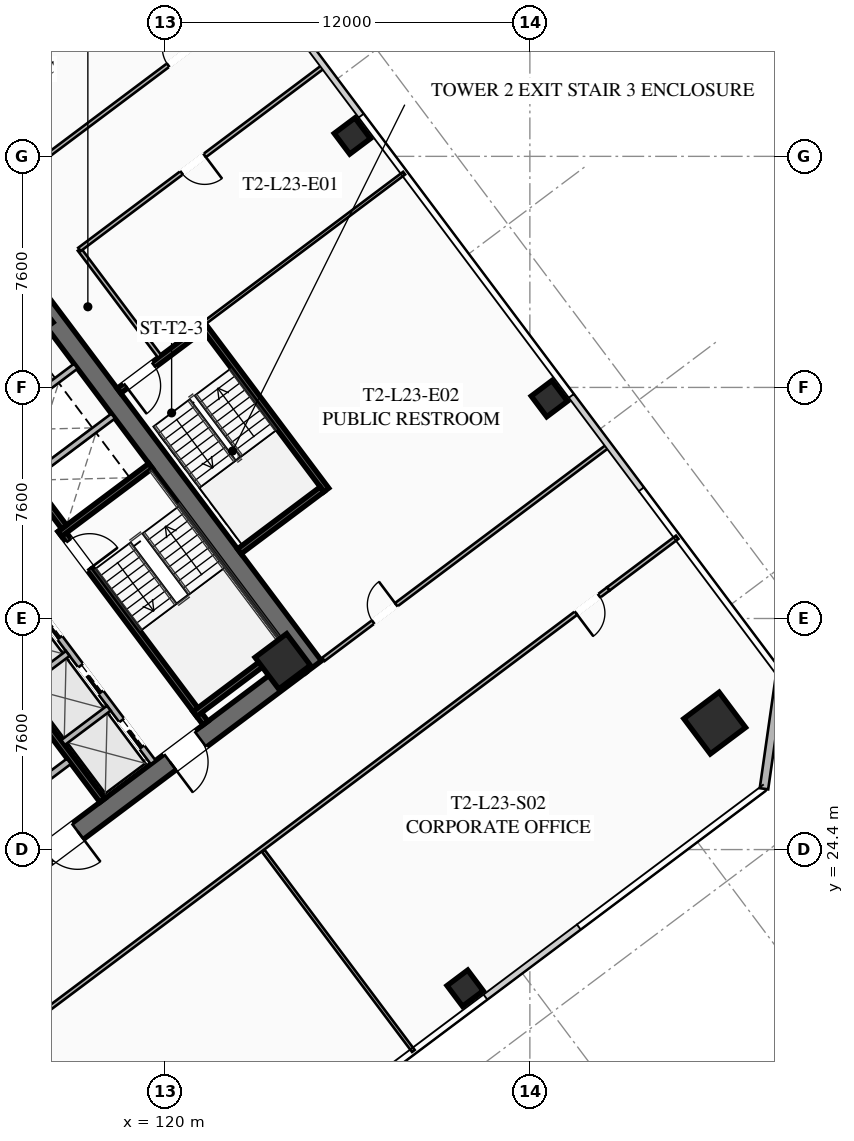
"""IFC4 building model, lengths in metres.
Left out: names, types, materials, properties, quantities, classifications, styles, units other than length and angle.
Written with IfcOpenShell. Run it as: python <this file> out.ifc"""

import sys

from ifc_helpers import new_model, si_unit, direction, frame, frame_2d, origin, origin_2d, place, context, subcontext, project, spatial, rectangle, hollow_rectangle, extrude, element, fill, save


model = new_model("IFC4")
c1 = context("Model", 3, precision=1e-05, world=origin(), true_north=direction((0.0, 1.0)))
c2 = subcontext(c1, "Body", "Model", "MODEL_VIEW")
j1 = project(units=[si_unit("LENGTHUNIT", "METRE"), si_unit("PLANEANGLEUNIT", "RADIAN")], contexts=[c1])
p1 = place(None, origin())
s1 = spatial("IfcSite", under=j1, at=p1, CompositionType="ELEMENT")
p2 = place(p1, origin())
s2 = spatial("IfcBuilding", under=s1, at=p2, CompositionType="ELEMENT")
p3 = place(p2, frame((0.0, 0.0, 88.5)))
s3 = spatial("IfcBuildingStorey", under=s2, at=p3, CompositionType="ELEMENT", Elevation=88.5)
p4 = place(p3, frame((115.524, 42.893, 0.0), z_axis=(0.0, 0.0, 1.0), x_axis=(0.600005007985, -0.799996243986, 0.0)))
e1 = element("IfcWall", 1, at=p4, inside=s3, PredefinedType="SHEAR", context=c2, shape_type="SweptSolid", body=[
    extrude(rectangle(XDim=15.6, YDim=0.65, at=frame_2d((7.8, 0.0))), origin(), (0.0, 0.0, 1.0), 3.55),
])
p5 = place(p3, frame((124.429, 30.478, 0.0), z_axis=(0.0, 0.0, 1.0), x_axis=(-0.799998028465, -0.600002628705, 0.0)))
e2 = element("IfcWall", 2, at=p5, inside=s3, PredefinedType="SHEAR", context=c2, shape_type="SweptSolid", body=[
    extrude(rectangle(XDim=14.86, YDim=0.65, at=frame_2d((7.43, 0.0))), origin(), (0.0, 0.0, 1.0), 3.55),
])
p6 = place(p5, frame((9.13, 0.0, 0.0)))
e3 = element("IfcOpeningElement", 3, at=p6, cuts=e2, PredefinedType="OPENING", context=c2, shape_type="SweptSolid", body=[
    extrude(rectangle(XDim=1.25, YDim=2.25, at=frame_2d((0.625, 1.125))), frame((0.0, 0.335, 0.0), z_axis=(0.0, -1.0, 0.0), x_axis=(1.0, 0.0, 0.0)), (0.0, 0.0, 1.0), 0.67),
])
p7 = place(p5, frame((4.08, 0.0, 0.0)))
e4 = element("IfcOpeningElement", 4, at=p7, cuts=e2, PredefinedType="OPENING", context=c2, shape_type="SweptSolid", body=[
    extrude(rectangle(XDim=1.25, YDim=2.25, at=frame_2d((0.625, 1.125))), frame((0.0, 0.335, 0.0), z_axis=(0.0, -1.0, 0.0), x_axis=(1.0, 0.0, 0.0)), (0.0, 0.0, 1.0), 0.67),
])
for number, where, z_axis, x_axis in (
    (5, (123.87, 30.59, 0.0), (0.0, 0.0, 1.0), (0.8, 0.6, 0.0)),
    (6, (115.41, 41.87, 0.0), (0.0, 0.0, 1.0), (0.8, 0.6, 0.0)),
):
    element("IfcColumn", number, at=place(p3, frame(where, z_axis=z_axis, x_axis=x_axis)), inside=s3, PredefinedType="COLUMN", context=c2, shape_type="SweptSolid", body=[
        extrude(hollow_rectangle(XDim=1.3, YDim=1.3, WallThickness=0.05, at=origin_2d()), origin(), (0.0, 0.0, 1.0), 3.35),
    ])
p8 = place(p3, frame((138.08, 28.56, 0.0), z_axis=(0.0, 0.0, 1.0), x_axis=(0.799999996291, 0.600000004945, 0.0)))
e7 = element("IfcColumn", 7, at=p8, inside=s3, PredefinedType="COLUMN", context=c2, shape_type="SweptSolid", body=[
    extrude(hollow_rectangle(XDim=1.45, YDim=1.45, WallThickness=0.055, at=origin_2d()), origin(), (0.0, 0.0, 1.0), 3.35),
])
for number, where, z_axis, x_axis in (
    (8, (129.87, 19.84, 0.0), (0.0, 0.0, 1.0), (0.8, 0.6, 0.0)),
    (9, (132.64, 39.23, 0.0), (0.0, 0.0, 1.0), (0.8, 0.6, 0.0)),
    (10, (126.16, 47.87, 0.0), (0.0, 0.0, 1.0), (0.8, 0.6, 0.0)),
):
    element("IfcColumn", number, at=place(p3, frame(where, z_axis=z_axis, x_axis=x_axis)), inside=s3, PredefinedType="COLUMN", context=c2, shape_type="SweptSolid", body=[
        extrude(hollow_rectangle(XDim=0.85, YDim=0.85, WallThickness=0.035, at=origin_2d()), origin(), (0.0, 0.0, 1.0), 3.35),
    ])
p9 = place(p3, frame((140.24, 30.18, 0.0), z_axis=(0.0, 0.0, 1.0), x_axis=(-0.141430307517, -0.989948214866, 0.0)))
e11 = element("IfcWall", 11, at=p9, inside=s3, PredefinedType="SOLIDWALL", context=c2, shape_type="SweptSolid", body=[
    extrude(rectangle(XDim=3.818, YDim=0.28, at=frame_2d((1.909, 0.0))), origin(), (0.0, 0.0, 1.0), 3.35),
])
p10 = place(p3, frame((116.56, 34.92, 0.0), z_axis=(0.0, 0.0, 1.0), x_axis=(0.600009827119, -0.799992629566, 0.0)))
e12 = element("IfcWall", 12, at=p10, inside=s3, PredefinedType="SHEAR", context=c2, shape_type="SweptSolid", body=[
    extrude(rectangle(XDim=7.95, YDim=0.2, at=frame_2d((3.975, 0.0))), origin(), (0.0, 0.0, 1.0), 3.35),
])
p11 = place(p10, frame((0.45, 0.0, 0.0)))
e13 = element("IfcOpeningElement", 13, at=p11, cuts=e12, PredefinedType="OPENING", context=c2, shape_type="SweptSolid", body=[
    extrude(rectangle(XDim=1.15, YDim=2.2, at=frame_2d((0.575, 1.1))), frame((0.0, 0.11, 0.0), z_axis=(0.0, -1.0, 0.0), x_axis=(1.0, 0.0, 0.0)), (0.0, 0.0, 1.0), 0.22),
])
for number, where, z_axis, x_axis in (
    (14, (116.54, 34.78, 0.0), (0.0, 0.0, 1.0), (0.8, 0.6, 0.0)),
    (15, (120.98, 28.86, 0.0), (0.0, 0.0, 1.0), (0.8, 0.6, 0.0)),
):
    element("IfcWall", number, at=place(p3, frame(where, z_axis=z_axis, x_axis=x_axis)), inside=s3, PredefinedType="SHEAR", context=c2, shape_type="SweptSolid", body=[
        extrude(rectangle(XDim=3.73, YDim=0.2, at=frame_2d((1.865, 0.0))), origin(), (0.0, 0.0, 1.0), 3.35),
    ])
p12 = place(p3, frame((117.938, 26.016, 0.0), z_axis=(0.0, 0.0, 1.0), x_axis=(-0.600005463273, 0.799995902516, 0.0)))
e16 = element("IfcWall", 16, at=p12, inside=s3, PredefinedType="SHEAR", context=c2, shape_type="SweptSolid", body=[
    extrude(rectangle(XDim=14.3, YDim=0.2, at=frame_2d((7.15, 0.0))), origin(), (0.0, 0.0, 1.0), 3.35),
])
p13 = place(p3, frame((114.316, 25.412, 0.0), z_axis=(0.0, 0.0, 1.0), x_axis=(0.800018601094, 0.59997519774, 0.0)))
e17 = element("IfcWall", 17, at=p13, inside=s3, PredefinedType="SOLIDWALL", context=c2, shape_type="SweptSolid", body=[
    extrude(rectangle(XDim=3.15, YDim=0.22, at=frame_2d((1.575, 0.0))), origin(), (0.0, 0.0, 1.0), 2.703),
])
p14 = place(p13, frame((0.95, 0.0, 0.0)))
e18 = element("IfcOpeningElement", 18, at=p14, cuts=e17, PredefinedType="OPENING", context=c2, shape_type="SweptSolid", body=[
    extrude(rectangle(XDim=1.25, YDim=2.25, at=frame_2d((0.625, 1.125))), frame((0.0, 0.12, 0.0), z_axis=(0.0, -1.0, 0.0), x_axis=(1.0, 0.0, 0.0)), (0.0, 0.0, 1.0), 0.24),
])
p15 = place(p3, frame((112.87, 40.09, 0.0), z_axis=(0.0, 0.0, 1.0), x_axis=(0.599975393228, -0.800018454488, 0.0)))
e19 = element("IfcWall", 19, at=p15, inside=s3, PredefinedType="SHEAR", context=c2, shape_type="SweptSolid", body=[
    extrude(rectangle(XDim=6.35, YDim=0.2, at=frame_2d((3.175, 0.0))), origin(), (0.0, 0.0, 1.0), 3.35),
])
for number, where, z_axis, x_axis in (
    (20, (115.59, 36.63, 0.0), (0.0, 0.0, 1.0), (0.8, 0.6, 0.0)),
    (21, (114.36, 38.27, 0.0), (0.0, 0.0, 1.0), (0.8, 0.6, 0.0)),
):
    element("IfcWall", number, at=place(p3, frame(where, z_axis=z_axis, x_axis=x_axis)), inside=s3, PredefinedType="SOLIDWALL", context=c2, shape_type="SweptSolid", body=[
        extrude(rectangle(XDim=3.38, YDim=0.2, at=frame_2d((1.69, 0.0))), origin(), (0.0, 0.0, 1.0), 3.35),
    ])
p16 = place(p3, frame((119.61, 27.27, 0.0), z_axis=(0.0, 0.0, 1.0), x_axis=(-0.600011488909, 0.79999138319, 0.0)))
e22 = element("IfcWall", 22, at=p16, inside=s3, PredefinedType="SOLIDWALL", context=c2, shape_type="SweptSolid", body=[
    extrude(rectangle(XDim=6.8, YDim=0.2, at=frame_2d((3.4, 0.0))), origin(), (0.0, 0.0, 1.0), 3.35),
])
p17 = place(p16, frame((0.625, 0.0, 0.0)))
e23 = element("IfcOpeningElement", 23, at=p17, cuts=e22, PredefinedType="OPENING", context=c2, shape_type="SweptSolid", body=[
    extrude(rectangle(XDim=1.1, YDim=2.2, at=frame_2d((0.55, 1.1))), frame((0.0, 0.11, 0.0), z_axis=(0.0, -1.0, 0.0), x_axis=(1.0, 0.0, 0.0)), (0.0, 0.0, 1.0), 0.22),
])
p18 = place(p16, frame((2.875, 0.0, 0.0)))
e24 = element("IfcOpeningElement", 24, at=p18, cuts=e22, PredefinedType="OPENING", context=c2, shape_type="SweptSolid", body=[
    extrude(rectangle(XDim=1.1, YDim=2.2, at=frame_2d((0.55, 1.1))), frame((0.0, 0.11, 0.0), z_axis=(0.0, -1.0, 0.0), x_axis=(1.0, 0.0, 0.0)), (0.0, 0.0, 1.0), 0.22),
])
p19 = place(p16, frame((5.125, 0.0, 0.0)))
e25 = element("IfcOpeningElement", 25, at=p19, cuts=e22, PredefinedType="OPENING", context=c2, shape_type="SweptSolid", body=[
    extrude(rectangle(XDim=1.1, YDim=2.2, at=frame_2d((0.55, 1.1))), frame((0.0, 0.11, 0.0), z_axis=(0.0, -1.0, 0.0), x_axis=(1.0, 0.0, 0.0)), (0.0, 0.0, 1.0), 0.22),
])
p20 = place(p3, frame((116.646, 27.922, 0.0), z_axis=(0.0, 0.0, 1.0), x_axis=(0.8, 0.6, 0.0)))
e26 = element("IfcWall", 26, at=p20, inside=s3, PredefinedType="SOLIDWALL", context=c2, shape_type="SweptSolid", body=[
    extrude(rectangle(XDim=1.88, YDim=0.2, at=frame_2d((0.94, 0.0))), origin(), (0.0, 0.0, 1.0), 3.35),
])
p21 = place(p3, frame((115.296, 29.722, 0.0), z_axis=(0.0, 0.0, 1.0), x_axis=(0.799984418148, 0.600020775241, 0.0)))
e27 = element("IfcWall", 27, at=p21, inside=s3, PredefinedType="SOLIDWALL", context=c2, shape_type="SweptSolid", body=[
    extrude(rectangle(XDim=1.88, YDim=0.2, at=frame_2d((0.94, 0.0))), origin(), (0.0, 0.0, 1.0), 3.35),
])
p22 = place(p3, frame((125.304, 36.228, 0.0), z_axis=(0.0, 0.0, 1.0), x_axis=(-0.59998851072, 0.800008616831, 0.0)))
e28 = element("IfcWall", 28, at=p22, inside=s3, PredefinedType="SHEAR", context=c2, shape_type="SweptSolid", body=[
    extrude(rectangle(XDim=6.8, YDim=0.2, at=frame_2d((3.4, 0.0))), origin(), (0.0, 0.0, 1.0), 3.35),
])
p23 = place(p3, frame((121.204, 41.528, 0.0), z_axis=(0.0, 0.0, 1.0), x_axis=(-0.800017232136, -0.599977023131, 0.0)))
e29 = element("IfcWall", 29, at=p23, inside=s3, PredefinedType="SHEAR", context=c2, shape_type="SweptSolid", body=[
    extrude(rectangle(XDim=3.4, YDim=0.2, at=frame_2d((1.7, 0.0))), origin(), (0.0, 0.0, 1.0), 3.35),
])
p24 = place(p23, frame((1.975, 0.0, 0.0)))
e30 = element("IfcOpeningElement", 30, at=p24, cuts=e29, PredefinedType="OPENING", context=c2, shape_type="SweptSolid", body=[
    extrude(rectangle(XDim=1.15, YDim=2.2, at=frame_2d((0.575, 1.1))), frame((0.0, 0.11, 0.0), z_axis=(0.0, -1.0, 0.0), x_axis=(1.0, 0.0, 0.0)), (0.0, 0.0, 1.0), 0.22),
])
p25 = place(p3, frame((122.444, 34.208, 0.0), z_axis=(0.0, 0.0, 1.0), x_axis=(0.79999138319, 0.600011488909, 0.0)))
e31 = element("IfcWall", 31, at=p25, inside=s3, PredefinedType="SHEAR", context=c2, shape_type="SweptSolid", body=[
    extrude(rectangle(XDim=3.4, YDim=0.2, at=frame_2d((1.7, 0.0))), origin(), (0.0, 0.0, 1.0), 3.35),
])
p26 = place(p3, frame((119.824, 40.618, 0.0), z_axis=(0.0, 0.0, 1.0), x_axis=(-0.599982243973, 0.800013316712, 0.0)))
e32 = element("IfcWall", 32, at=p26, inside=s3, PredefinedType="PARTITIONING", context=c2, shape_type="SweptSolid", body=[
    extrude(rectangle(XDim=4.4, YDim=0.135, at=frame_2d((2.2, 0.0))), origin(), (0.0, 0.0, 1.0), 2.703),
])
p27 = place(p3, frame((98.516, 34.012, 0.0), z_axis=(0.0, 0.0, 1.0), x_axis=(0.8, 0.6, 0.0)))
e33 = element("IfcWall", 33, at=p27, inside=s3, PredefinedType="PARTITIONING", context=c2, shape_type="SweptSolid", body=[
    extrude(rectangle(XDim=28.23, YDim=0.135, at=frame_2d((14.115, 0.0))), origin(), (0.0, 0.0, 1.0), 2.703),
])
p28 = place(p27, frame((0.3, 0.0, 0.0)))
e34 = element("IfcOpeningElement", 34, at=p28, cuts=e33, PredefinedType="OPENING", context=c2, shape_type="SweptSolid", body=[
    extrude(rectangle(XDim=0.95, YDim=2.05, at=frame_2d((0.475, 1.025))), frame((0.0, 0.077, 0.0), z_axis=(0.0, -1.0, 0.0), x_axis=(1.0, 0.0, 0.0)), (0.0, 0.0, 1.0), 0.155),
])
p29 = place(p27, frame((26.98, 0.0, 0.0)))
e35 = element("IfcOpeningElement", 35, at=p29, cuts=e33, PredefinedType="OPENING", context=c2, shape_type="SweptSolid", body=[
    extrude(rectangle(XDim=0.95, YDim=2.05, at=frame_2d((0.475, 1.025))), frame((0.0, 0.077, 0.0), z_axis=(0.0, -1.0, 0.0), x_axis=(1.0, 0.0, 0.0)), (0.0, 0.0, 1.0), 0.155),
])
p30 = place(p3, frame((134.582, 32.974, 0.0), z_axis=(0.0, 0.0, 1.0), x_axis=(-0.799995848831, -0.600005534853, 0.0)))
e36 = element("IfcWall", 36, at=p30, inside=s3, PredefinedType="PARTITIONING", context=c2, shape_type="SweptSolid", body=[
    extrude(rectangle(XDim=28.23, YDim=0.135, at=frame_2d((14.115, 0.0))), origin(), (0.0, 0.0, 1.0), 2.703),
])
p31 = place(p30, frame((26.9, 0.0, 0.0)))
e37 = element("IfcOpeningElement", 37, at=p31, cuts=e36, PredefinedType="OPENING", context=c2, shape_type="SweptSolid", body=[
    extrude(rectangle(XDim=0.95, YDim=2.05, at=frame_2d((0.475, 1.025))), frame((0.0, 0.077, 0.0), z_axis=(0.0, -1.0, 0.0), x_axis=(1.0, 0.0, 0.0)), (0.0, 0.0, 1.0), 0.155),
])
p32 = place(p30, frame((0.38, 0.0, 0.0)))
e38 = element("IfcOpeningElement", 38, at=p32, cuts=e36, PredefinedType="OPENING", context=c2, shape_type="SweptSolid", body=[
    extrude(rectangle(XDim=0.95, YDim=2.05, at=frame_2d((0.475, 1.025))), frame((0.0, 0.077, 0.0), z_axis=(0.0, -1.0, 0.0), x_axis=(1.0, 0.0, 0.0)), (0.0, 0.0, 1.0), 0.155),
])
p33 = place(p3, frame((134.582, 32.974, 0.0), z_axis=(0.0, 0.0, 1.0), x_axis=(0.799989647378, 0.600013803248, 0.0)))
e39 = element("IfcWall", 39, at=p33, inside=s3, PredefinedType="PARTITIONING", context=c2, shape_type="SweptSolid", body=[
    extrude(rectangle(XDim=2.83, YDim=0.135, at=frame_2d((1.415, 0.0))), origin(), (0.0, 0.0, 1.0), 2.703),
])
p34 = place(p3, frame((128.168, 17.776, 0.0), z_axis=(0.0, 0.0, 1.0), x_axis=(-0.599985761145, 0.800010678943, 0.0)))
e40 = element("IfcWall", 40, at=p34, inside=s3, PredefinedType="PARTITIONING", context=c2, shape_type="SweptSolid", body=[
    extrude(rectangle(XDim=8.23, YDim=0.11, at=frame_2d((4.115, 0.0))), origin(), (0.0, 0.0, 1.0), 2.703),
])
p35 = place(p3, frame((125.224, 50.168, 0.0), z_axis=(0.0, 0.0, 1.0), x_axis=(-0.8, -0.6, 0.0)))
e41 = element("IfcWall", 41, at=p35, inside=s3, PredefinedType="PARTITIONING", context=c2, shape_type="SweptSolid", body=[
    extrude(rectangle(XDim=10.05, YDim=0.135, at=frame_2d((5.025, 0.0))), origin(), (0.0, 0.0, 1.0), 2.703),
])
p36 = place(p35, frame((4.9, 0.0, 0.0)))
e42 = element("IfcOpeningElement", 42, at=p36, cuts=e41, PredefinedType="OPENING", context=c2, shape_type="SweptSolid", body=[
    extrude(rectangle(XDim=0.95, YDim=2.05, at=frame_2d((0.475, 1.025))), frame((0.0, 0.077, 0.0), z_axis=(0.0, -1.0, 0.0), x_axis=(1.0, 0.0, 0.0)), (0.0, 0.0, 1.0), 0.155),
])
p37 = place(p3, frame((125.208, 30.656, 0.0), z_axis=(0.0, 0.0, 1.0), x_axis=(0.8, 0.6, 0.0)))
e43 = element("IfcWall", 43, at=p37, inside=s3, PredefinedType="PARTITIONING", context=c2, shape_type="SweptSolid", body=[
    extrude(rectangle(XDim=11.72, YDim=0.135, at=frame_2d((5.86, 0.0))), origin(), (0.0, 0.0, 1.0), 2.703),
])
p38 = place(p37, frame((2.045, 0.0, 0.0)))
e44 = element("IfcOpeningElement", 44, at=p38, cuts=e43, PredefinedType="OPENING", context=c2, shape_type="SweptSolid", body=[
    extrude(rectangle(XDim=0.95, YDim=2.05, at=frame_2d((0.475, 1.025))), frame((0.0, 0.077, 0.0), z_axis=(0.0, -1.0, 0.0), x_axis=(1.0, 0.0, 0.0)), (0.0, 0.0, 1.0), 0.155),
])
p39 = place(p3, frame((127.864, 46.648, 0.0), z_axis=(0.0, 0.0, 1.0), x_axis=(-0.800007145523, -0.599990472518, 0.0)))
e45 = element("IfcWall", 45, at=p39, inside=s3, PredefinedType="PARTITIONING", context=c2, shape_type="SweptSolid", body=[
    extrude(rectangle(XDim=8.2, YDim=0.11, at=frame_2d((4.1, 0.0))), origin(), (0.0, 0.0, 1.0), 2.703),
])
p40 = place(p6, origin())
e46 = element("IfcDoor", 46, at=p40, inside=s3, OperationType="SINGLE_SWING_LEFT", PredefinedType="DOOR", context=c2, shape_type="SweptSolid", body=[
    extrude(rectangle(XDim=1.25, YDim=2.25, at=frame_2d((0.625, 1.125))), frame((0.0, 0.025, 0.0), z_axis=(0.0, -1.0, 0.0), x_axis=(1.0, 0.0, 0.0)), (0.0, 0.0, 1.0), 0.05),
])
fill(e3, e46)
p41 = place(p7, origin())
e47 = element("IfcDoor", 47, at=p41, inside=s3, OperationType="SINGLE_SWING_RIGHT", PredefinedType="DOOR", context=c2, shape_type="SweptSolid", body=[
    extrude(rectangle(XDim=1.25, YDim=2.25, at=frame_2d((0.625, 1.125))), frame((0.0, 0.025, 0.0), z_axis=(0.0, -1.0, 0.0), x_axis=(1.0, 0.0, 0.0)), (0.0, 0.0, 1.0), 0.05),
])
fill(e4, e47)
p42 = place(p11, origin())
e48 = element("IfcDoor", 48, at=p42, inside=s3, OperationType="SINGLE_SWING_RIGHT", PredefinedType="DOOR", context=c2, shape_type="SweptSolid", body=[
    extrude(rectangle(XDim=1.15, YDim=2.2, at=frame_2d((0.575, 1.1))), frame((0.0, 0.025, 0.0), z_axis=(0.0, -1.0, 0.0), x_axis=(1.0, 0.0, 0.0)), (0.0, 0.0, 1.0), 0.05),
])
fill(e13, e48)
p43 = place(p24, origin())
e49 = element("IfcDoor", 49, at=p43, inside=s3, OperationType="SINGLE_SWING_RIGHT", PredefinedType="DOOR", context=c2, shape_type="SweptSolid", body=[
    extrude(rectangle(XDim=1.15, YDim=2.2, at=frame_2d((0.575, 1.1))), frame((0.0, 0.025, 0.0), z_axis=(0.0, -1.0, 0.0), x_axis=(1.0, 0.0, 0.0)), (0.0, 0.0, 1.0), 0.05),
])
fill(e30, e49)
p44 = place(p29, origin())
e50 = element("IfcDoor", 50, at=p44, inside=s3, OperationType="SINGLE_SWING_RIGHT", PredefinedType="DOOR", context=c2, shape_type="SweptSolid", body=[
    extrude(rectangle(XDim=0.95, YDim=2.05, at=frame_2d((0.475, 1.025))), frame((0.0, 0.025, 0.0), z_axis=(0.0, -1.0, 0.0), x_axis=(1.0, 0.0, 0.0)), (0.0, 0.0, 1.0), 0.05),
])
fill(e35, e50)
p45 = place(p32, origin())
e51 = element("IfcDoor", 51, at=p45, inside=s3, OperationType="SINGLE_SWING_RIGHT", PredefinedType="DOOR", context=c2, shape_type="SweptSolid", body=[
    extrude(rectangle(XDim=0.95, YDim=2.05, at=frame_2d((0.475, 1.025))), frame((0.0, 0.025, 0.0), z_axis=(0.0, -1.0, 0.0), x_axis=(1.0, 0.0, 0.0)), (0.0, 0.0, 1.0), 0.05),
])
fill(e38, e51)
p46 = place(p36, origin())
e52 = element("IfcDoor", 52, at=p46, inside=s3, OperationType="SINGLE_SWING_LEFT", PredefinedType="DOOR", context=c2, shape_type="SweptSolid", body=[
    extrude(rectangle(XDim=0.95, YDim=2.05, at=frame_2d((0.475, 1.025))), frame((0.0, 0.025, 0.0), z_axis=(0.0, -1.0, 0.0), x_axis=(1.0, 0.0, 0.0)), (0.0, 0.0, 1.0), 0.05),
])
fill(e42, e52)
p47 = place(p38, origin())
e53 = element("IfcDoor", 53, at=p47, inside=s3, OperationType="SINGLE_SWING_RIGHT", PredefinedType="DOOR", context=c2, shape_type="SweptSolid", body=[
    extrude(rectangle(XDim=0.95, YDim=2.05, at=frame_2d((0.475, 1.025))), frame((0.0, 0.025, 0.0), z_axis=(0.0, -1.0, 0.0), x_axis=(1.0, 0.0, 0.0)), (0.0, 0.0, 1.0), 0.05),
])
fill(e44, e53)
p48 = place(p17, origin())
e54 = element("IfcDoor", 54, at=p48, inside=s3, OperationType="SLIDING_TO_LEFT", PredefinedType="DOOR", context=c2, shape_type="SweptSolid", body=[
    extrude(rectangle(XDim=1.1, YDim=2.2, at=frame_2d((0.55, 1.1))), frame((0.0, 0.025, 0.0), z_axis=(0.0, -1.0, 0.0), x_axis=(1.0, 0.0, 0.0)), (0.0, 0.0, 1.0), 0.05),
])
fill(e23, e54)
p49 = place(p18, origin())
e55 = element("IfcDoor", 55, at=p49, inside=s3, OperationType="SLIDING_TO_LEFT", PredefinedType="DOOR", context=c2, shape_type="SweptSolid", body=[
    extrude(rectangle(XDim=1.1, YDim=2.2, at=frame_2d((0.55, 1.1))), frame((0.0, 0.025, 0.0), z_axis=(0.0, -1.0, 0.0), x_axis=(1.0, 0.0, 0.0)), (0.0, 0.0, 1.0), 0.05),
])
fill(e24, e55)
p50 = place(p19, origin())
e56 = element("IfcDoor", 56, at=p50, inside=s3, OperationType="SLIDING_TO_LEFT", PredefinedType="DOOR", context=c2, shape_type="SweptSolid", body=[
    extrude(rectangle(XDim=1.1, YDim=2.2, at=frame_2d((0.55, 1.1))), frame((0.0, 0.025, 0.0), z_axis=(0.0, -1.0, 0.0), x_axis=(1.0, 0.0, 0.0)), (0.0, 0.0, 1.0), 0.05),
])
fill(e25, e56)
save(model, sys.argv[1])
